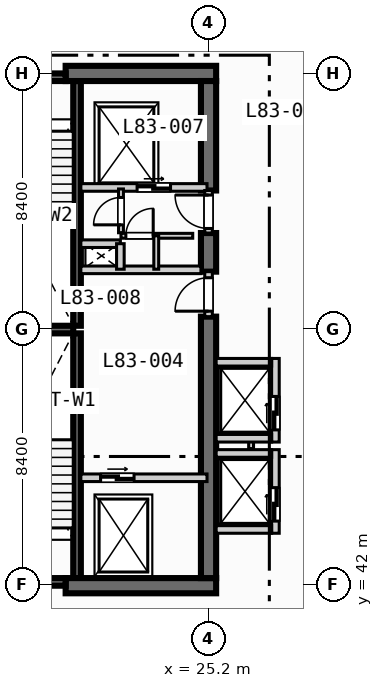
"""IFC4 building model, lengths in metres.
Left out: names, types, materials, properties, quantities, classifications, styles, units other than length and angle.
Written with IfcOpenShell. Run it as: python <this file> out.ifc"""

import sys

from ifc_helpers import new_model, si_unit, direction, frame, frame_2d, origin, place, context, subcontext, project, spatial, rectangle, extrude, element, fill, save


model = new_model("IFC4")
c1 = context("Model", 3, precision=1e-05, world=origin(), true_north=direction((0.0, 1.0)))
c2 = subcontext(c1, "Body", "Model", "MODEL_VIEW")
j1 = project(units=[si_unit("LENGTHUNIT", "METRE"), si_unit("PLANEANGLEUNIT", "RADIAN")], contexts=[c1])
p1 = place(None, origin())
s1 = spatial("IfcSite", under=j1, at=p1, CompositionType="ELEMENT")
p2 = place(p1, origin())
s2 = spatial("IfcBuilding", under=s1, at=p2, CompositionType="ELEMENT")
p3 = place(p2, frame((0.0, 0.0, 335.9)))
s3 = spatial("IfcBuildingStorey", under=s2, at=p3, CompositionType="ELEMENT", Elevation=335.9)
for number, where, z_axis, x_axis in (
    (1, (20.875, 42.2, 0.0), (0.0, 0.0, 1.0), (0.0, 1.0, 0.0)),
    (2, (20.875, 50.5, 0.0), (0.0, 0.0, 1.0), (0.0, 1.0, 0.0)),
):
    element("IfcWall", number, at=place(p3, frame(where, z_axis=z_axis, x_axis=x_axis)), inside=s3, PredefinedType="SOLIDWALL", context=c2, shape_type="SweptSolid", body=[
        extrude(rectangle(XDim=8.05, YDim=0.25, at=frame_2d((4.025, 0.0))), origin(), (0.0, 0.0, 1.0), 3.67),
    ])
p4 = place(p3, frame((17.25, 50.375, 0.0), z_axis=(0.0, 0.0, 1.0), x_axis=(1.0, 0.0, 0.0)))
e3 = element("IfcWall", 3, at=p4, inside=s3, PredefinedType="SOLIDWALL", context=c2, shape_type="SweptSolid", body=[
    extrude(rectangle(XDim=3.5, YDim=0.25, at=frame_2d((1.75, 0.0))), origin(), (0.0, 0.0, 1.0), 3.67),
])
for number, where, z_axis, x_axis in (
    (4, (20.5, 41.95, 0.0), (0.0, 0.0, 1.0), (1.0, 0.0, 0.0)),
    (5, (20.5, 58.8, 0.0), (0.0, 0.0, 1.0), (1.0, 0.0, 0.0)),
):
    element("IfcWall", number, at=place(p3, frame(where, z_axis=z_axis, x_axis=x_axis)), inside=s3, PredefinedType="SHEAR", context=c2, shape_type="SweptSolid", body=[
        extrude(rectangle(XDim=4.95, YDim=0.5, at=frame_2d((2.475, 0.0))), origin(), (0.0, 0.0, 1.0), 3.67),
    ])
p5 = place(p3, frame((25.2, 42.2, 0.0), z_axis=(0.0, 0.0, 1.0), x_axis=(0.0, 1.0, 0.0)))
e6 = element("IfcWall", 6, at=p5, inside=s3, PredefinedType="SHEAR", context=c2, shape_type="SweptSolid", body=[
    extrude(rectangle(XDim=8.6, YDim=0.5, at=frame_2d((4.3, 0.0))), origin(), (0.0, 0.0, 1.0), 3.67),
])
p6 = place(p3, frame((25.2, 52.28, 0.0), z_axis=(0.0, 0.0, 1.0), x_axis=(0.0, 1.0, 0.0)))
e7 = element("IfcWall", 7, at=p6, inside=s3, PredefinedType="SHEAR", context=c2, shape_type="SweptSolid", body=[
    extrude(rectangle(XDim=1.27, YDim=0.5, at=frame_2d((0.635, 0.0))), origin(), (0.0, 0.0, 1.0), 3.67),
])
p7 = place(p3, frame((25.2, 54.95, 0.0), z_axis=(0.0, 0.0, 1.0), x_axis=(0.0, 1.0, 0.0)))
e8 = element("IfcWall", 8, at=p7, inside=s3, PredefinedType="SHEAR", context=c2, shape_type="SweptSolid", body=[
    extrude(rectangle(XDim=3.6, YDim=0.5, at=frame_2d((1.8, 0.0))), origin(), (0.0, 0.0, 1.0), 3.67),
])
p8 = place(p3, frame((18.0, 42.075, 0.0), z_axis=(0.0, 0.0, 1.0), x_axis=(1.0, 0.0, 0.0)))
e9 = element("IfcWall", 9, at=p8, inside=s3, PredefinedType="SOLIDWALL", context=c2, shape_type="SweptSolid", body=[
    extrude(rectangle(XDim=2.5, YDim=0.25, at=frame_2d((1.25, 0.0))), origin(), (0.0, 0.0, 1.0), 3.67),
])
p9 = place(p8, frame((0.7, 0.0, 0.0)))
e10 = element("IfcOpeningElement", 10, at=p9, cuts=e9, PredefinedType="OPENING", context=c2, shape_type="SweptSolid", body=[
    extrude(rectangle(XDim=1.1, YDim=2.15, at=frame_2d((0.55, 1.075))), frame((0.0, 0.135, 0.0), z_axis=(0.0, -1.0, 0.0), x_axis=(1.0, 0.0, 0.0)), (0.0, 0.0, 1.0), 0.27),
])
p10 = place(p3, frame((18.0, 58.675, 0.0), z_axis=(0.0, 0.0, 1.0), x_axis=(1.0, 0.0, 0.0)))
e11 = element("IfcWall", 11, at=p10, inside=s3, PredefinedType="SOLIDWALL", context=c2, shape_type="SweptSolid", body=[
    extrude(rectangle(XDim=2.5, YDim=0.25, at=frame_2d((1.25, 0.0))), origin(), (0.0, 0.0, 1.0), 3.67),
])
p11 = place(p10, frame((0.7, 0.0, 0.0)))
e12 = element("IfcOpeningElement", 12, at=p11, cuts=e11, PredefinedType="OPENING", context=c2, shape_type="SweptSolid", body=[
    extrude(rectangle(XDim=1.1, YDim=2.15, at=frame_2d((0.55, 1.075))), frame((0.0, 0.135, 0.0), z_axis=(0.0, -1.0, 0.0), x_axis=(1.0, 0.0, 0.0)), (0.0, 0.0, 1.0), 0.27),
])
p12 = place(p3, frame((21.0, 45.5, 0.0), z_axis=(0.0, 0.0, 1.0), x_axis=(1.0, 0.0, 0.0)))
e13 = element("IfcWall", 13, at=p12, inside=s3, PredefinedType="SOLIDWALL", context=c2, shape_type="SweptSolid", body=[
    extrude(rectangle(XDim=4.15, YDim=0.25, at=frame_2d((2.075, 0.0))), origin(), (0.0, 0.0, 1.0), 3.67),
])
p13 = place(p12, frame((0.65, 0.0, 0.0)))
e14 = element("IfcOpeningElement", 14, at=p13, cuts=e13, PredefinedType="OPENING", context=c2, shape_type="SweptSolid", body=[
    extrude(rectangle(XDim=1.1, YDim=2.15, at=frame_2d((0.55, 1.075))), frame((0.0, 0.135, 0.0), z_axis=(0.0, -1.0, 0.0), x_axis=(1.0, 0.0, 0.0)), (0.0, 0.0, 1.0), 0.27),
])
p14 = place(p3, frame((25.2, 50.8, 0.0), z_axis=(0.0, 0.0, 1.0), x_axis=(0.0, 1.0, 0.0)))
e15 = element("IfcWall", 15, at=p14, inside=s3, PredefinedType="SOLIDWALL", context=c2, shape_type="SweptSolid", body=[
    extrude(rectangle(XDim=1.48, YDim=0.25, at=frame_2d((0.74, 0.0))), origin(), (0.0, 0.0, 1.0), 3.67),
])
p15 = place(p14, frame((0.18, 0.0, 0.0)))
e16 = element("IfcOpeningElement", 16, at=p15, cuts=e15, PredefinedType="OPENING", context=c2, shape_type="SweptSolid", body=[
    extrude(rectangle(XDim=1.1, YDim=2.15, at=frame_2d((0.55, 1.075))), frame((0.0, 0.135, 0.0), z_axis=(0.0, -1.0, 0.0), x_axis=(1.0, 0.0, 0.0)), (0.0, 0.0, 1.0), 0.27),
])
p16 = place(p3, frame((21.0, 52.34, 0.0), z_axis=(0.0, 0.0, 1.0), x_axis=(1.0, 0.0, 0.0)))
e17 = element("IfcWall", 17, at=p16, inside=s3, PredefinedType="SOLIDWALL", context=c2, shape_type="SweptSolid", body=[
    extrude(rectangle(XDim=3.95, YDim=0.25, at=frame_2d((1.975, 0.0))), origin(), (0.0, 0.0, 1.0), 3.67),
])
p17 = place(p3, frame((21.0, 55.05, 0.0), z_axis=(0.0, 0.0, 1.0), x_axis=(1.0, 0.0, 0.0)))
e18 = element("IfcWall", 18, at=p17, inside=s3, PredefinedType="SOLIDWALL", context=c2, shape_type="SweptSolid", body=[
    extrude(rectangle(XDim=4.15, YDim=0.25, at=frame_2d((2.075, 0.0))), origin(), (0.0, 0.0, 1.0), 3.67),
])
p18 = place(p17, frame((1.85, 0.0, 0.0)))
e19 = element("IfcOpeningElement", 19, at=p18, cuts=e18, PredefinedType="OPENING", context=c2, shape_type="SweptSolid", body=[
    extrude(rectangle(XDim=1.1, YDim=2.15, at=frame_2d((0.55, 1.075))), frame((0.0, 0.135, 0.0), z_axis=(0.0, -1.0, 0.0), x_axis=(1.0, 0.0, 0.0)), (0.0, 0.0, 1.0), 0.27),
])
p19 = place(p3, frame((25.2, 53.55, 0.0), z_axis=(0.0, 0.0, 1.0), x_axis=(0.0, 1.0, 0.0)))
e20 = element("IfcWall", 20, at=p19, inside=s3, PredefinedType="SOLIDWALL", context=c2, shape_type="SweptSolid", body=[
    extrude(rectangle(XDim=1.4, YDim=0.25, at=frame_2d((0.7, 0.0))), origin(), (0.0, 0.0, 1.0), 3.67),
])
p20 = place(p19, frame((0.15, 0.0, 0.0)))
e21 = element("IfcOpeningElement", 21, at=p20, cuts=e20, PredefinedType="OPENING", context=c2, shape_type="SweptSolid", body=[
    extrude(rectangle(XDim=1.1, YDim=2.15, at=frame_2d((0.55, 1.075))), frame((0.0, 0.135, 0.0), z_axis=(0.0, -1.0, 0.0), x_axis=(1.0, 0.0, 0.0)), (0.0, 0.0, 1.0), 0.27),
])
p21 = place(p3, frame((21.0, 53.2, 0.0), z_axis=(0.0, 0.0, 1.0), x_axis=(1.0, 0.0, 0.0)))
e22 = element("IfcWall", 22, at=p21, inside=s3, PredefinedType="SOLIDWALL", context=c2, shape_type="SweptSolid", body=[
    extrude(rectangle(XDim=1.3, YDim=0.25, at=frame_2d((0.65, 0.0))), origin(), (0.0, 0.0, 1.0), 3.67),
])
p22 = place(p3, frame((22.3, 52.36, 0.0), z_axis=(0.0, 0.0, 1.0), x_axis=(0.0, 1.0, 0.0)))
e23 = element("IfcWall", 23, at=p22, inside=s3, PredefinedType="SOLIDWALL", context=c2, shape_type="SweptSolid", body=[
    extrude(rectangle(XDim=0.84, YDim=0.25, at=frame_2d((0.42, 0.0))), origin(), (0.0, 0.0, 1.0), 3.67),
])
p23 = place(p3, frame((22.32, 53.56, 0.0), z_axis=(0.0, 0.0, 1.0), x_axis=(0.0, 1.0, 0.0)))
e24 = element("IfcWall", 24, at=p23, inside=s3, PredefinedType="PARTITIONING", context=c2, shape_type="SweptSolid", body=[
    extrude(rectangle(XDim=1.44, YDim=0.16, at=frame_2d((0.72, 0.0))), origin(), (0.0, 0.0, 1.0), 3.67),
])
p24 = place(p23, frame((0.26, 0.0, 0.0)))
e25 = element("IfcOpeningElement", 25, at=p24, cuts=e24, PredefinedType="OPENING", context=c2, shape_type="SweptSolid", body=[
    extrude(rectangle(XDim=0.9, YDim=2.1, at=frame_2d((0.45, 1.05))), frame((0.0, 0.09, 0.0), z_axis=(0.0, -1.0, 0.0), x_axis=(1.0, 0.0, 0.0)), (0.0, 0.0, 1.0), 0.18),
])
p25 = place(p3, frame((22.32, 53.46, 0.0), z_axis=(0.0, 0.0, 1.0), x_axis=(1.0, 0.0, 0.0)))
e26 = element("IfcWall", 26, at=p25, inside=s3, PredefinedType="PARTITIONING", context=c2, shape_type="SweptSolid", body=[
    extrude(rectangle(XDim=2.36, YDim=0.16, at=frame_2d((1.18, 0.0))), origin(), (0.0, 0.0, 1.0), 3.67),
])
p26 = place(p25, frame((0.16, 0.0, 0.0)))
e27 = element("IfcOpeningElement", 27, at=p26, cuts=e26, PredefinedType="OPENING", context=c2, shape_type="SweptSolid", body=[
    extrude(rectangle(XDim=0.9, YDim=2.1, at=frame_2d((0.45, 1.05))), frame((0.0, 0.09, 0.0), z_axis=(0.0, -1.0, 0.0), x_axis=(1.0, 0.0, 0.0)), (0.0, 0.0, 1.0), 0.18),
])
p27 = place(p3, frame((23.48, 52.36, 0.0), z_axis=(0.0, 0.0, 1.0), x_axis=(0.0, 1.0, 0.0)))
e28 = element("IfcWall", 28, at=p27, inside=s3, PredefinedType="PARTITIONING", context=c2, shape_type="SweptSolid", body=[
    extrude(rectangle(XDim=1.1, YDim=0.16, at=frame_2d((0.55, 0.0))), origin(), (0.0, 0.0, 1.0), 3.67),
])
p28 = place(p3, frame((27.4, 43.675, 0.0), z_axis=(0.0, 0.0, 1.0), x_axis=(0.0, 1.0, 0.0)))
e29 = element("IfcWall", 29, at=p28, inside=s3, PredefinedType="SOLIDWALL", context=c2, shape_type="SweptSolid", body=[
    extrude(rectangle(XDim=2.75, YDim=0.25, at=frame_2d((1.375, 0.0))), origin(), (0.0, 0.0, 1.0), 3.67),
])
p29 = place(p28, frame((0.4, 0.0, 0.0)))
e30 = element("IfcOpeningElement", 30, at=p29, cuts=e29, PredefinedType="OPENING", context=c2, shape_type="SweptSolid", body=[
    extrude(rectangle(XDim=1.1, YDim=2.15, at=frame_2d((0.55, 1.075))), frame((0.0, 0.135, 0.0), z_axis=(0.0, -1.0, 0.0), x_axis=(1.0, 0.0, 0.0)), (0.0, 0.0, 1.0), 0.27),
])
for number, where, z_axis, x_axis in (
    (31, (25.45, 43.8, 0.0), (0.0, 0.0, 1.0), (1.0, 0.0, 0.0)),
    (32, (25.45, 46.3, 0.0), (0.0, 0.0, 1.0), (1.0, 0.0, 0.0)),
):
    element("IfcWall", number, at=place(p3, frame(where, z_axis=z_axis, x_axis=x_axis)), inside=s3, PredefinedType="SOLIDWALL", context=c2, shape_type="SweptSolid", body=[
        extrude(rectangle(XDim=1.825, YDim=0.25, at=frame_2d((0.913, 0.0))), origin(), (0.0, 0.0, 1.0), 3.67),
    ])
p30 = place(p3, frame((26.6, 46.46, 0.0), z_axis=(0.0, 0.0, 1.0), x_axis=(0.0, 1.0, 0.0)))
e33 = element("IfcWall", 33, at=p30, inside=s3, PredefinedType="PARTITIONING", context=c2, shape_type="SweptSolid", body=[
    extrude(rectangle(XDim=0.88, YDim=0.16, at=frame_2d((0.44, 0.0))), origin(), (0.0, 0.0, 1.0), 3.67),
])
p31 = place(p3, frame((27.4, 46.675, 0.0), z_axis=(0.0, 0.0, 1.0), x_axis=(0.0, 1.0, 0.0)))
e34 = element("IfcWall", 34, at=p31, inside=s3, PredefinedType="SOLIDWALL", context=c2, shape_type="SweptSolid", body=[
    extrude(rectangle(XDim=2.75, YDim=0.25, at=frame_2d((1.375, 0.0))), origin(), (0.0, 0.0, 1.0), 3.67),
])
p32 = place(p31, frame((0.4, 0.0, 0.0)))
e35 = element("IfcOpeningElement", 35, at=p32, cuts=e34, PredefinedType="OPENING", context=c2, shape_type="SweptSolid", body=[
    extrude(rectangle(XDim=1.1, YDim=2.15, at=frame_2d((0.55, 1.075))), frame((0.0, 0.135, 0.0), z_axis=(0.0, -1.0, 0.0), x_axis=(1.0, 0.0, 0.0)), (0.0, 0.0, 1.0), 0.27),
])
for number, where, z_axis, x_axis in (
    (36, (25.45, 46.8, 0.0), (0.0, 0.0, 1.0), (1.0, 0.0, 0.0)),
    (37, (25.45, 49.3, 0.0), (0.0, 0.0, 1.0), (1.0, 0.0, 0.0)),
):
    element("IfcWall", number, at=place(p3, frame(where, z_axis=z_axis, x_axis=x_axis)), inside=s3, PredefinedType="SOLIDWALL", context=c2, shape_type="SweptSolid", body=[
        extrude(rectangle(XDim=1.825, YDim=0.25, at=frame_2d((0.913, 0.0))), origin(), (0.0, 0.0, 1.0), 3.67),
    ])
p33 = place(p13, origin())
e38 = element("IfcDoor", 38, at=p33, inside=s3, OperationType="SLIDING_TO_LEFT", PredefinedType="DOOR", context=c2, shape_type="SweptSolid", body=[
    extrude(rectangle(XDim=1.1, YDim=2.15, at=frame_2d((0.55, 1.075))), frame((0.0, 0.025, 0.0), z_axis=(0.0, -1.0, 0.0), x_axis=(1.0, 0.0, 0.0)), (0.0, 0.0, 1.0), 0.05),
])
fill(e14, e38)
p34 = place(p15, origin())
e39 = element("IfcDoor", 39, at=p34, inside=s3, OperationType="SINGLE_SWING_LEFT", PredefinedType="DOOR", context=c2, shape_type="SweptSolid", body=[
    extrude(rectangle(XDim=1.1, YDim=2.15, at=frame_2d((0.55, 1.075))), frame((0.0, 0.025, 0.0), z_axis=(0.0, -1.0, 0.0), x_axis=(1.0, 0.0, 0.0)), (0.0, 0.0, 1.0), 0.05),
])
fill(e16, e39)
p35 = place(p18, origin())
e40 = element("IfcDoor", 40, at=p35, inside=s3, OperationType="SLIDING_TO_LEFT", PredefinedType="DOOR", context=c2, shape_type="SweptSolid", body=[
    extrude(rectangle(XDim=1.1, YDim=2.15, at=frame_2d((0.55, 1.075))), frame((0.0, 0.025, 0.0), z_axis=(0.0, -1.0, 0.0), x_axis=(1.0, 0.0, 0.0)), (0.0, 0.0, 1.0), 0.05),
])
fill(e19, e40)
p36 = place(p20, origin())
e41 = element("IfcDoor", 41, at=p36, inside=s3, OperationType="SINGLE_SWING_RIGHT", PredefinedType="DOOR", context=c2, shape_type="SweptSolid", body=[
    extrude(rectangle(XDim=1.1, YDim=2.15, at=frame_2d((0.55, 1.075))), frame((0.0, 0.025, 0.0), z_axis=(0.0, -1.0, 0.0), x_axis=(1.0, 0.0, 0.0)), (0.0, 0.0, 1.0), 0.05),
])
fill(e21, e41)
p37 = place(p24, origin())
e42 = element("IfcDoor", 42, at=p37, inside=s3, OperationType="SINGLE_SWING_LEFT", PredefinedType="DOOR", context=c2, shape_type="SweptSolid", body=[
    extrude(rectangle(XDim=0.9, YDim=2.1, at=frame_2d((0.45, 1.05))), frame((0.0, 0.025, 0.0), z_axis=(0.0, -1.0, 0.0), x_axis=(1.0, 0.0, 0.0)), (0.0, 0.0, 1.0), 0.05),
])
fill(e25, e42)
p38 = place(p26, origin())
e43 = element("IfcDoor", 43, at=p38, inside=s3, OperationType="SINGLE_SWING_RIGHT", PredefinedType="DOOR", context=c2, shape_type="SweptSolid", body=[
    extrude(rectangle(XDim=0.9, YDim=2.1, at=frame_2d((0.45, 1.05))), frame((0.0, 0.025, 0.0), z_axis=(0.0, -1.0, 0.0), x_axis=(1.0, 0.0, 0.0)), (0.0, 0.0, 1.0), 0.05),
])
fill(e27, e43)
p39 = place(p29, origin())
e44 = element("IfcDoor", 44, at=p39, inside=s3, OperationType="SLIDING_TO_LEFT", PredefinedType="DOOR", context=c2, shape_type="SweptSolid", body=[
    extrude(rectangle(XDim=1.1, YDim=2.15, at=frame_2d((0.55, 1.075))), frame((0.0, 0.025, 0.0), z_axis=(0.0, -1.0, 0.0), x_axis=(1.0, 0.0, 0.0)), (0.0, 0.0, 1.0), 0.05),
])
fill(e30, e44)
p40 = place(p32, origin())
e45 = element("IfcDoor", 45, at=p40, inside=s3, OperationType="SLIDING_TO_LEFT", PredefinedType="DOOR", context=c2, shape_type="SweptSolid", body=[
    extrude(rectangle(XDim=1.1, YDim=2.15, at=frame_2d((0.55, 1.075))), frame((0.0, 0.025, 0.0), z_axis=(0.0, -1.0, 0.0), x_axis=(1.0, 0.0, 0.0)), (0.0, 0.0, 1.0), 0.05),
])
fill(e35, e45)
save(model, sys.argv[1])
